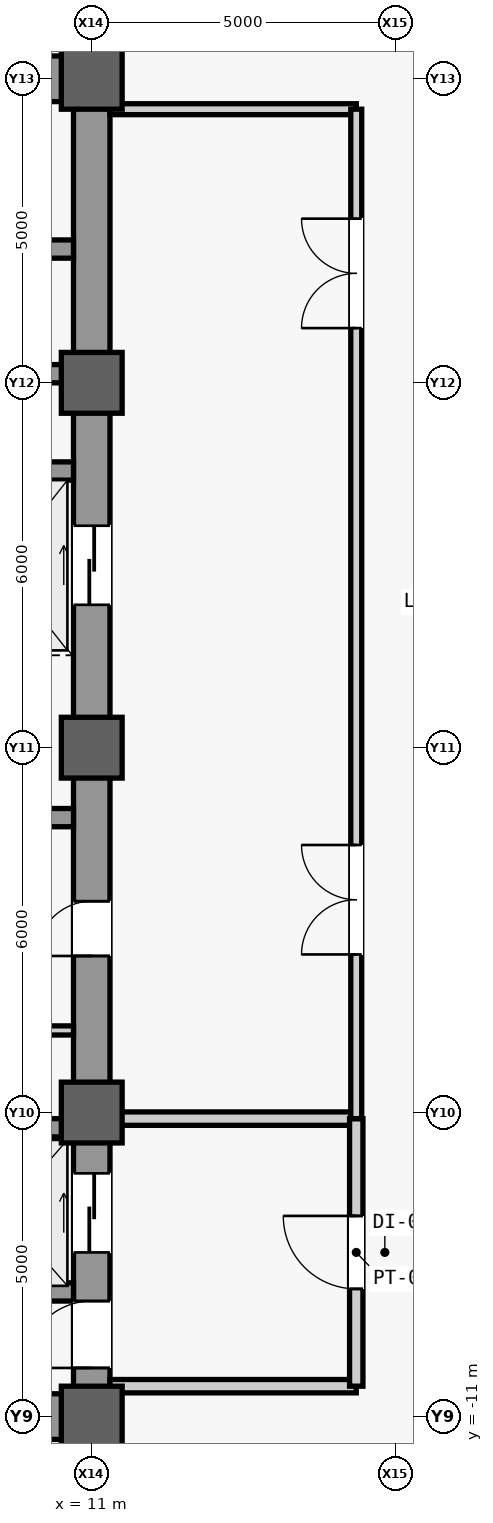
"""IFC4 building model, lengths in metres.
Left out: names, types, materials, properties, quantities, classifications, styles, units other than length and angle.
Written with IfcOpenShell. Run it as: python <this file> out.ifc"""

import sys

from ifc_helpers import new_model, si_unit, direction, frame, frame_2d, origin, origin_2d, place, context, subcontext, project, spatial, rectangle, extrude, source, transform, mapped, element, fill, save


model = new_model("IFC4")
c1 = context("Model", 3, precision=1e-05, world=origin(), true_north=direction((0.0, 1.0)))
c2 = subcontext(c1, "Body", "Model", "MODEL_VIEW")
j1 = project(units=[si_unit("LENGTHUNIT", "METRE"), si_unit("PLANEANGLEUNIT", "RADIAN")], contexts=[c1])
p1 = place(None, origin())
s1 = spatial("IfcSite", under=j1, at=p1, CompositionType="ELEMENT")
p2 = place(p1, origin())
s2 = spatial("IfcBuilding", under=s1, at=p2, CompositionType="ELEMENT")
p3 = place(p2, frame((0.0, 0.0, 116.0)))
s3 = spatial("IfcBuildingStorey", under=s2, at=p3, CompositionType="ELEMENT", Elevation=116.0)
m1 = source(origin(), c2, "Body", "SweptSolid", [
    extrude(rectangle(XDim=22.0, YDim=0.6, at=frame_2d((11.0, 0.0))), origin(), (0.0, 0.0, 1.0), 3.84),
])
p4 = place(p3, frame((11.0, -11.0, 0.0), z_axis=(0.0, 0.0, 1.0), x_axis=(0.0, 1.0, 0.0)))
e1 = element("IfcWall", 1, at=p4, inside=s3, PredefinedType="SHEAR", context=c2, shape_type="MappedRepresentation", body=[
    mapped(m1, transform((0.0, 0.0, 0.0), scale=1.0)),
])
m2 = source(origin(), c2, "Body", "SweptSolid", [
    extrude(rectangle(XDim=1.1, YDim=2.2, at=frame_2d((0.55, 1.1))), frame((0.0, 0.31, 0.0), z_axis=(0.0, -1.0, 0.0), x_axis=(1.0, 0.0, 0.0)), (0.0, 0.0, 1.0), 0.62),
])
p5 = place(p4, frame((0.8, 0.0, 0.0)))
e2 = element("IfcOpeningElement", 2, at=p5, cuts=e1, PredefinedType="OPENING", context=c2, shape_type="MappedRepresentation", body=[
    mapped(m2, transform((0.0, 0.0, 0.0), scale=1.0)),
])
m3 = source(origin(), c2, "Body", "SweptSolid", [
    extrude(rectangle(XDim=0.9, YDim=2.15, at=frame_2d((0.45, 1.075))), frame((0.0, 0.31, 0.0), z_axis=(0.0, -1.0, 0.0), x_axis=(1.0, 0.0, 0.0)), (0.0, 0.0, 1.0), 0.62),
])
p6 = place(p4, frame((7.575, 0.0, 0.0)))
e3 = element("IfcOpeningElement", 3, at=p6, cuts=e1, PredefinedType="OPENING", context=c2, shape_type="MappedRepresentation", body=[
    mapped(m3, transform((0.0, 0.0, 0.0), scale=1.0)),
])
m4 = source(origin(), c2, "Body", "SweptSolid", [
    extrude(rectangle(XDim=1.3, YDim=2.3, at=frame_2d((0.65, 1.15))), frame((0.0, 0.31, 0.0), z_axis=(0.0, -1.0, 0.0), x_axis=(1.0, 0.0, 0.0)), (0.0, 0.0, 1.0), 0.62),
])
p7 = place(p4, frame((2.7, 0.0, 0.0)))
e4 = element("IfcOpeningElement", 4, at=p7, cuts=e1, PredefinedType="OPENING", context=c2, shape_type="MappedRepresentation", body=[
    mapped(m4, transform((0.0, 0.0, 0.0), scale=1.0)),
])
p8 = place(p4, frame((13.35, 0.0, 0.0)))
e5 = element("IfcOpeningElement", 5, at=p8, cuts=e1, PredefinedType="OPENING", context=c2, shape_type="MappedRepresentation", body=[
    mapped(m4, transform((0.0, 0.0, 0.0), scale=1.0)),
])
m5 = source(origin(), c2, "Body", "SweptSolid", [
    extrude(rectangle(XDim=5.85, YDim=0.75, at=frame_2d((2.925, 0.0))), origin(), (0.0, 0.0, 1.0), 3.84),
])
p9 = place(p3, frame((4.85, -11.0, 0.0), z_axis=(0.0, 0.0, 1.0), x_axis=(1.0, 0.0, 0.0)))
e6 = element("IfcWall", 6, at=p9, inside=s3, PredefinedType="SHEAR", context=c2, shape_type="MappedRepresentation", body=[
    mapped(m5, transform((0.0, 0.0, 0.0), scale=1.0)),
])
p10 = place(p3, frame((4.85, 11.0, 0.0), z_axis=(0.0, 0.0, 1.0), x_axis=(1.0, 0.0, 0.0)))
e7 = element("IfcWall", 7, at=p10, inside=s3, PredefinedType="SHEAR", context=c2, shape_type="MappedRepresentation", body=[
    mapped(m5, transform((0.0, 0.0, 0.0), scale=1.0)),
])
m6 = source(origin(), c2, "Body", "SweptSolid", [
    extrude(rectangle(XDim=0.9, YDim=2.15, at=frame_2d((0.45, 1.075))), frame((0.0, 0.385, 0.0), z_axis=(0.0, -1.0, 0.0), x_axis=(1.0, 0.0, 0.0)), (0.0, 0.0, 1.0), 0.77),
])
p11 = place(p10, frame((0.5, 0.0, 0.0)))
e8 = element("IfcOpeningElement", 8, at=p11, cuts=e7, PredefinedType="OPENING", context=c2, shape_type="MappedRepresentation", body=[
    mapped(m6, transform((0.0, 0.0, 0.0), scale=1.0)),
])
m7 = source(origin(), c2, "Body", "SweptSolid", [
    extrude(rectangle(XDim=5.6, YDim=0.3, at=frame_2d((2.8, 0.0))), origin(), (0.0, 0.0, 1.0), 3.84),
])
p12 = place(p3, frame((5.1, -1.15, 0.0), z_axis=(0.0, 0.0, 1.0), x_axis=(1.0, 0.0, 0.0)))
e9 = element("IfcWall", 9, at=p12, inside=s3, PredefinedType="SHEAR", context=c2, shape_type="MappedRepresentation", body=[
    mapped(m7, transform((0.0, 0.0, 0.0), scale=1.0)),
])
m8 = source(origin(), c2, "Body", "SweptSolid", [
    extrude(rectangle(XDim=1.0, YDim=1.0, at=origin_2d()), origin(), (0.0, 0.0, 1.0), 4.1),
])
for number, where, z_axis, x_axis in (
    (10, (11.0, -11.0, 0.0), (0.0, 0.0, 1.0), (1.0, 0.0, 0.0)),
    (11, (11.0, -6.0, 0.0), (0.0, 0.0, 1.0), (1.0, 0.0, 0.0)),
    (12, (11.0, 0.0, 0.0), (0.0, 0.0, 1.0), (1.0, 0.0, 0.0)),
    (13, (11.0, 6.0, 0.0), (0.0, 0.0, 1.0), (1.0, 0.0, 0.0)),
    (14, (11.0, 11.0, 0.0), (0.0, 0.0, 1.0), (1.0, 0.0, 0.0)),
):
    element("IfcColumn", number, at=place(p3, frame(where, z_axis=z_axis, x_axis=x_axis)), inside=s3, PredefinedType="COLUMN", context=c2, shape_type="MappedRepresentation", body=[
        mapped(m8, transform((0.0, 0.0, 0.0), scale=1.0)),
    ])
m9 = source(origin(), c2, "Body", "SweptSolid", [
    extrude(rectangle(XDim=2.2, YDim=0.3, at=frame_2d((1.1, 0.0))), origin(), (0.0, 0.0, 1.0), 3.84),
])
for number, where, z_axis, x_axis in (
    (15, (8.5, -8.95, 0.0), (0.0, 0.0, 1.0), (1.0, 0.0, 0.0)),
    (16, (8.5, -6.25, 0.0), (0.0, 0.0, 1.0), (1.0, 0.0, 0.0)),
):
    element("IfcWall", number, at=place(p3, frame(where, z_axis=z_axis, x_axis=x_axis)), inside=s3, PredefinedType="SHEAR", context=c2, shape_type="MappedRepresentation", body=[
        mapped(m9, transform((0.0, 0.0, 0.0), scale=1.0)),
    ])
m10 = source(origin(), c2, "Body", "SweptSolid", [
    extrude(rectangle(XDim=2.3, YDim=0.3, at=frame_2d((1.15, 0.0))), origin(), (0.0, 0.0, 1.0), 3.84),
])
for number, where, z_axis, x_axis in (
    (17, (8.4, 4.55, 0.0), (0.0, 0.0, 1.0), (1.0, 0.0, 0.0)),
    (18, (8.4, 6.15, 0.0), (0.0, 0.0, 1.0), (1.0, 0.0, 0.0)),
    (19, (8.4, 8.2, 0.0), (0.0, 0.0, 1.0), (1.0, 0.0, 0.0)),
):
    element("IfcWall", number, at=place(p3, frame(where, z_axis=z_axis, x_axis=x_axis)), inside=s3, PredefinedType="SHEAR", context=c2, shape_type="MappedRepresentation", body=[
        mapped(m10, transform((0.0, 0.0, 0.0), scale=1.0)),
    ])
m11 = source(origin(), c2, "Body", "SweptSolid", [
    extrude(rectangle(XDim=2.05, YDim=0.15, at=frame_2d((1.025, 0.0))), origin(), (0.0, 0.0, 1.0), 3.84),
])
p13 = place(p3, frame((8.65, -4.65, 0.0), z_axis=(0.0, 0.0, 1.0), x_axis=(1.0, 0.0, 0.0)))
e20 = element("IfcWall", 20, at=p13, inside=s3, PredefinedType="PARTITIONING", context=c2, shape_type="MappedRepresentation", body=[
    mapped(m11, transform((0.0, 0.0, 0.0), scale=1.0)),
])
m12 = source(origin(), c2, "Body", "SweptSolid", [
    extrude(rectangle(XDim=4.05, YDim=0.22, at=frame_2d((2.025, 0.0))), origin(), (0.0, 0.0, 1.0), 3.84),
])
p14 = place(p3, frame((11.3, -10.5, 0.0), z_axis=(0.0, 0.0, 1.0), x_axis=(1.0, 0.0, 0.0)))
e21 = element("IfcWall", 21, at=p14, inside=s3, PredefinedType="PARTITIONING", context=c2, shape_type="MappedRepresentation", body=[
    mapped(m12, transform((0.0, 0.0, 0.0), scale=1.0)),
])
m13 = source(origin(), c2, "Body", "SweptSolid", [
    extrude(rectangle(XDim=4.05, YDim=0.22, at=frame_2d((2.025, 0.0))), origin(), (0.0, 0.0, 1.0), 3.067),
])
p15 = place(p3, frame((11.3, -6.1, 0.0), z_axis=(0.0, 0.0, 1.0), x_axis=(1.0, 0.0, 0.0)))
e22 = element("IfcWall", 22, at=p15, inside=s3, PredefinedType="PARTITIONING", context=c2, shape_type="MappedRepresentation", body=[
    mapped(m13, transform((0.0, 0.0, 0.0), scale=1.0)),
])
m14 = source(origin(), c2, "Body", "SweptSolid", [
    extrude(rectangle(XDim=4.4, YDim=0.22, at=frame_2d((2.2, 0.0))), origin(), (0.0, 0.0, 1.0), 3.84),
])
p16 = place(p3, frame((15.35, -10.5, 0.0), z_axis=(0.0, 0.0, 1.0), x_axis=(0.0, 1.0, 0.0)))
e23 = element("IfcWall", 23, at=p16, inside=s3, PredefinedType="PARTITIONING", context=c2, shape_type="MappedRepresentation", body=[
    mapped(m14, transform((0.0, 0.0, 0.0), scale=1.0)),
])
m15 = source(origin(), c2, "Body", "SweptSolid", [
    extrude(rectangle(XDim=1.2, YDim=2.2, at=frame_2d((0.6, 1.1))), frame((0.0, 0.12, 0.0), z_axis=(0.0, -1.0, 0.0), x_axis=(1.0, 0.0, 0.0)), (0.0, 0.0, 1.0), 0.24),
])
p17 = place(p16, frame((1.6, 0.0, 0.0)))
e24 = element("IfcOpeningElement", 24, at=p17, cuts=e23, PredefinedType="OPENING", context=c2, shape_type="MappedRepresentation", body=[
    mapped(m15, transform((0.0, 0.0, 0.0), scale=1.0)),
])
m16 = source(origin(), c2, "Body", "SweptSolid", [
    extrude(rectangle(XDim=4.05, YDim=0.18, at=frame_2d((2.025, 0.0))), origin(), (0.0, 0.0, 1.0), 3.84),
])
p18 = place(p3, frame((11.3, 10.5, 0.0), z_axis=(0.0, 0.0, 1.0), x_axis=(1.0, 0.0, 0.0)))
e25 = element("IfcWall", 25, at=p18, inside=s3, PredefinedType="PARTITIONING", context=c2, shape_type="MappedRepresentation", body=[
    mapped(m16, transform((0.0, 0.0, 0.0), scale=1.0)),
])
m17 = source(origin(), c2, "Body", "SweptSolid", [
    extrude(rectangle(XDim=16.6, YDim=0.18, at=frame_2d((8.3, 0.0))), origin(), (0.0, 0.0, 1.0), 3.84),
])
p19 = place(p3, frame((15.35, -6.1, 0.0), z_axis=(0.0, 0.0, 1.0), x_axis=(0.0, 1.0, 0.0)))
e26 = element("IfcWall", 26, at=p19, inside=s3, PredefinedType="PARTITIONING", context=c2, shape_type="MappedRepresentation", body=[
    mapped(m17, transform((0.0, 0.0, 0.0), scale=1.0)),
])
m18 = source(origin(), c2, "Body", "SweptSolid", [
    extrude(rectangle(XDim=1.8, YDim=2.25, at=frame_2d((0.9, 1.125))), frame((0.0, 0.1, 0.0), z_axis=(0.0, -1.0, 0.0), x_axis=(1.0, 0.0, 0.0)), (0.0, 0.0, 1.0), 0.2),
])
p20 = place(p19, frame((2.7, 0.0, 0.0)))
e27 = element("IfcOpeningElement", 27, at=p20, cuts=e26, PredefinedType="OPENING", context=c2, shape_type="MappedRepresentation", body=[
    mapped(m18, transform((0.0, 0.0, 0.0), scale=1.0)),
])
p21 = place(p19, frame((13.0, 0.0, 0.0)))
e28 = element("IfcOpeningElement", 28, at=p21, cuts=e26, PredefinedType="OPENING", context=c2, shape_type="MappedRepresentation", body=[
    mapped(m18, transform((0.0, 0.0, 0.0), scale=1.0)),
])
m19 = source(origin(), c2, "Body", "SweptSolid", [
    extrude(rectangle(XDim=1.1, YDim=2.2, at=frame_2d((0.55, 1.1))), frame((0.0, 0.025, 0.0), z_axis=(0.0, -1.0, 0.0), x_axis=(1.0, 0.0, 0.0)), (0.0, 0.0, 1.0), 0.05),
])
p22 = place(p5, origin())
e29 = element("IfcDoor", 29, at=p22, inside=s3, OperationType="SINGLE_SWING_LEFT", PredefinedType="DOOR", context=c2, shape_type="MappedRepresentation", body=[
    mapped(m19, transform((0.0, 0.0, 0.0), scale=1.0)),
])
fill(e2, e29)
m20 = source(origin(), c2, "Body", "SweptSolid", [
    extrude(rectangle(XDim=0.9, YDim=2.15, at=frame_2d((0.45, 1.075))), frame((0.0, 0.025, 0.0), z_axis=(0.0, -1.0, 0.0), x_axis=(1.0, 0.0, 0.0)), (0.0, 0.0, 1.0), 0.05),
])
p23 = place(p6, origin())
e30 = element("IfcDoor", 30, at=p23, inside=s3, OperationType="SINGLE_SWING_LEFT", PredefinedType="DOOR", context=c2, shape_type="MappedRepresentation", body=[
    mapped(m20, transform((0.0, 0.0, 0.0), scale=1.0)),
])
fill(e3, e30)
m21 = source(origin(), c2, "Body", "SweptSolid", [
    extrude(rectangle(XDim=1.2, YDim=2.2, at=frame_2d((0.6, 1.1))), frame((0.0, 0.025, 0.0), z_axis=(0.0, -1.0, 0.0), x_axis=(1.0, 0.0, 0.0)), (0.0, 0.0, 1.0), 0.05),
])
p24 = place(p17, origin())
e31 = element("IfcDoor", 31, at=p24, inside=s3, OperationType="SINGLE_SWING_RIGHT", PredefinedType="DOOR", context=c2, shape_type="MappedRepresentation", body=[
    mapped(m21, transform((0.0, 0.0, 0.0), scale=1.0)),
])
fill(e24, e31)
m22 = source(origin(), c2, "Body", "SweptSolid", [
    extrude(rectangle(XDim=1.8, YDim=2.25, at=frame_2d((0.9, 1.125))), frame((0.0, 0.025, 0.0), z_axis=(0.0, -1.0, 0.0), x_axis=(1.0, 0.0, 0.0)), (0.0, 0.0, 1.0), 0.05),
])
p25 = place(p20, origin())
e32 = element("IfcDoor", 32, at=p25, inside=s3, OperationType="SINGLE_SWING_RIGHT", PredefinedType="DOOR", context=c2, shape_type="MappedRepresentation", body=[
    mapped(m22, transform((0.0, 0.0, 0.0), scale=1.0)),
])
fill(e27, e32)
p26 = place(p21, origin())
e33 = element("IfcDoor", 33, at=p26, inside=s3, OperationType="SINGLE_SWING_LEFT", PredefinedType="DOOR", context=c2, shape_type="MappedRepresentation", body=[
    mapped(m22, transform((0.0, 0.0, 0.0), scale=1.0)),
])
fill(e28, e33)
m23 = source(origin(), c2, "Body", "SweptSolid", [
    extrude(rectangle(XDim=1.3, YDim=2.3, at=frame_2d((0.65, 1.15))), frame((0.0, 0.025, 0.0), z_axis=(0.0, -1.0, 0.0), x_axis=(1.0, 0.0, 0.0)), (0.0, 0.0, 1.0), 0.05),
])
p27 = place(p7, origin())
e34 = element("IfcDoor", 34, at=p27, inside=s3, OperationType="SLIDING_TO_LEFT", PredefinedType="DOOR", context=c2, shape_type="MappedRepresentation", body=[
    mapped(m23, transform((0.0, 0.0, 0.0), scale=1.0)),
])
fill(e4, e34)
p28 = place(p8, origin())
e35 = element("IfcDoor", 35, at=p28, inside=s3, OperationType="SLIDING_TO_LEFT", PredefinedType="DOOR", context=c2, shape_type="MappedRepresentation", body=[
    mapped(m23, transform((0.0, 0.0, 0.0), scale=1.0)),
])
fill(e5, e35)
save(model, sys.argv[1])
